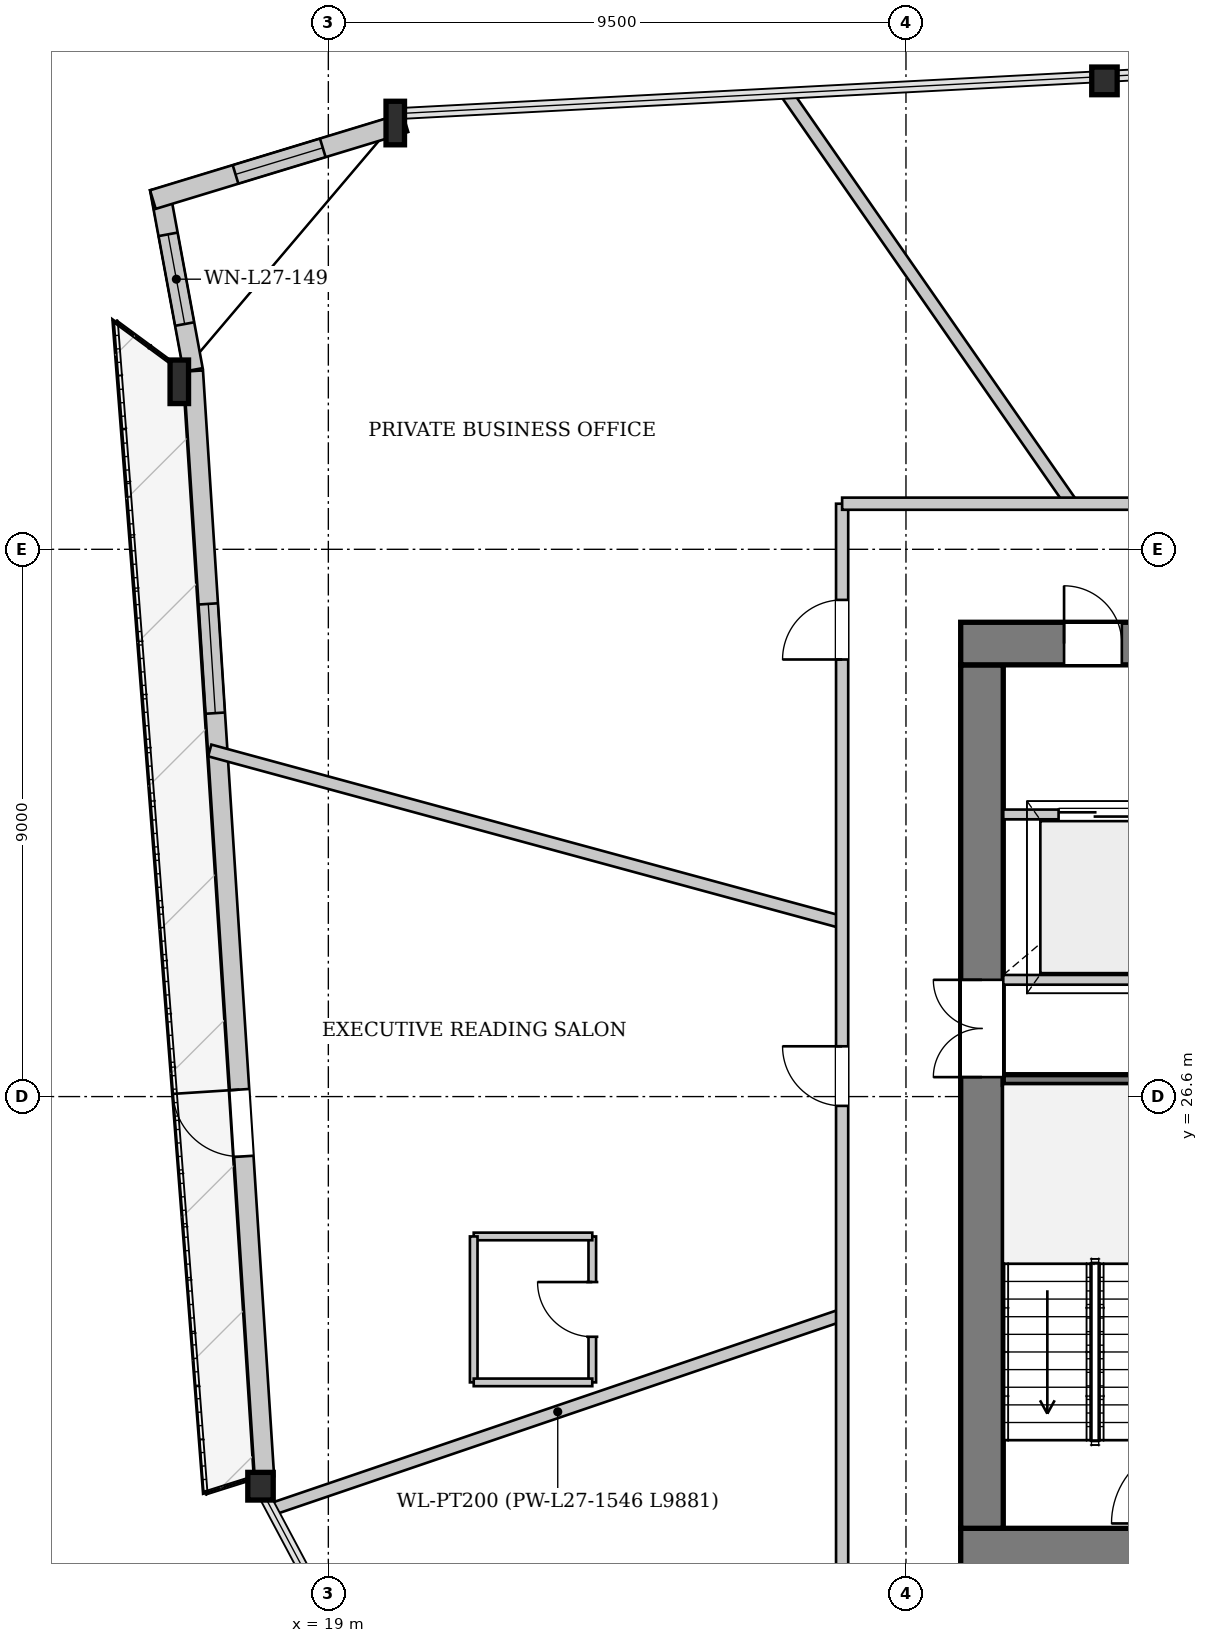
"""IFC4 building model, lengths in metres.
Left out: names, types, materials, properties, quantities, classifications, styles, units other than length and angle.
Written with IfcOpenShell. Run it as: python <this file> out.ifc"""

import sys

from ifc_helpers import new_model, si_unit, direction, frame, frame_2d, origin, origin_2d, place, context, subcontext, project, spatial, rectangle, i_section, extrude, source, transform, mapped, element, fill, save


model = new_model("IFC4")
c1 = context("Model", 3, precision=1e-05, world=origin(), true_north=direction((0.0, 1.0)))
c2 = subcontext(c1, "Body", "Model", "MODEL_VIEW")
j1 = project(units=[si_unit("LENGTHUNIT", "METRE"), si_unit("PLANEANGLEUNIT", "RADIAN")], contexts=[c1])
p1 = place(None, origin())
s1 = spatial("IfcSite", under=j1, at=p1, CompositionType="ELEMENT")
p2 = place(p1, origin())
s2 = spatial("IfcBuilding", under=s1, at=p2, CompositionType="ELEMENT")
p3 = place(p2, frame((0.0, 0.0, 105.7)))
s3 = spatial("IfcBuildingStorey", under=s2, at=p3, CompositionType="ELEMENT", Elevation=105.7)
m1 = source(origin(), c2, "Body", "SweptSolid", [
    extrude(i_section(OverallWidth=0.418, OverallDepth=0.455, WebThickness=0.038, FlangeThickness=0.059, at=origin_2d()), origin(), (0.0, 0.0, 1.0), 3.399),
])
p4 = place(p3, frame((31.897, 43.383, 0.0), z_axis=(-0.078216564077, -0.046685736134, 0.995842663851), x_axis=(0.512523153055, -0.858673405657, 0.0)))
e1 = element("IfcColumn", 1, at=p4, inside=s3, PredefinedType="COLUMN", context=c2, shape_type="MappedRepresentation", body=[
    mapped(m1, transform((0.0, 0.0, 0.0), x_axis=(1.0, 0.0, 0.0), y_axis=(0.0, 1.0, 0.0), z_axis=(0.0, 0.0, 1.0), scale=1.0)),
])
m2 = source(origin(), c2, "Body", "SweptSolid", [
    extrude(i_section(OverallWidth=0.304, OverallDepth=0.716, WebThickness=0.021, FlangeThickness=0.04, at=origin_2d()), origin(), (0.0, 0.0, 1.0), 3.408),
])
p5 = place(p3, frame((20.221, 42.769, 0.0), z_axis=(-0.070696817794, -0.093331259965, 0.993121964246), x_axis=(0.797127838914, -0.603810573299, 0.0)))
e2 = element("IfcColumn", 2, at=p5, inside=s3, PredefinedType="COLUMN", context=c2, shape_type="MappedRepresentation", body=[
    mapped(m2, transform((0.0, 0.0, 0.0), x_axis=(1.0, 0.0, 0.0), y_axis=(0.0, 1.0, 0.0), z_axis=(0.0, 0.0, 1.0), scale=1.0)),
])
m3 = source(origin(), c2, "Body", "SweptSolid", [
    extrude(i_section(OverallWidth=0.304, OverallDepth=0.716, WebThickness=0.021, FlangeThickness=0.04, at=origin_2d()), origin(), (0.0, 0.0, 1.0), 3.404),
])
p6 = place(p3, frame((16.619, 38.521, 0.0), z_axis=(-0.041093797697, -0.097821884919, 0.994355157186), x_axis=(0.921953144934, -0.387301431119, 0.0)))
e3 = element("IfcColumn", 3, at=p6, inside=s3, PredefinedType="COLUMN", context=c2, shape_type="MappedRepresentation", body=[
    mapped(m3, transform((0.0, 0.0, 0.0), x_axis=(1.0, 0.0, 0.0), y_axis=(0.0, 1.0, 0.0), z_axis=(0.0, 0.0, 1.0), scale=1.0)),
])
m4 = source(origin(), c2, "Body", "SweptSolid", [
    extrude(i_section(OverallWidth=0.418, OverallDepth=0.455, WebThickness=0.038, FlangeThickness=0.059, at=origin_2d()), origin(), (0.0, 0.0, 1.0), 3.403),
])
p7 = place(p3, frame((17.789, 20.337, 0.0), z_axis=(0.056108980358, -0.084737475451, 0.994822266828), x_axis=(0.833784053008, 0.552090710798, 0.0)))
e4 = element("IfcColumn", 4, at=p7, inside=s3, PredefinedType="COLUMN", context=c2, shape_type="MappedRepresentation", body=[
    mapped(m4, transform((0.0, 0.0, 0.0), x_axis=(1.0, 0.0, 0.0), y_axis=(0.0, 1.0, 0.0), z_axis=(0.0, 0.0, 1.0), scale=1.0)),
])
p8 = place(p3, frame((17.949, 20.347, 0.0), z_axis=(0.0, 0.0, 1.0), x_axis=(-0.06421657242, 0.997935985836, 0.0)))
e5 = element("IfcWall", 5, at=p8, inside=s3, PredefinedType="SOLIDWALL", context=c2, shape_type="SweptSolid", body=[
    extrude(rectangle(XDim=18.222, YDim=0.32, at=frame_2d((9.111, 0.0))), origin(), (0.0, 0.0, 1.0), 2.692),
])
p9 = place(p8, frame((5.281, 0.0, 0.0)))
e6 = element("IfcOpeningElement", 6, at=p9, cuts=e5, PredefinedType="OPENING", context=c2, shape_type="SweptSolid", body=[
    extrude(rectangle(XDim=1.1, YDim=2.3, at=frame_2d((0.55, 1.15))), frame((0.0, 0.17, 0.0), z_axis=(0.0, -1.0, 0.0), x_axis=(1.0, 0.0, 0.0)), (0.0, 0.0, 1.0), 0.34),
])
p10 = place(p8, frame((12.585, 0.0, 0.372)))
e7 = element("IfcOpeningElement", 7, at=p10, cuts=e5, PredefinedType="OPENING", context=c2, shape_type="SweptSolid", body=[
    extrude(rectangle(XDim=1.8, YDim=2.2, at=frame_2d((0.9, 1.1))), frame((0.0, 0.17, 0.0), z_axis=(0.0, -1.0, 0.0), x_axis=(1.0, 0.0, 0.0)), (0.0, 0.0, 1.0), 0.34),
])
p11 = place(p3, frame((16.776, 38.55, 0.0), z_axis=(0.0, 0.0, 1.0), x_axis=(-0.181703114271, 0.98335343507, 0.0)))
e8 = element("IfcWall", 8, at=p11, inside=s3, PredefinedType="SOLIDWALL", context=c2, shape_type="SweptSolid", body=[
    extrude(rectangle(XDim=3.034, YDim=0.32, at=frame_2d((1.517, 0.0))), origin(), (0.0, 0.0, 1.0), 2.692),
])
p12 = place(p11, frame((0.767, 0.0, 0.272)))
e9 = element("IfcOpeningElement", 9, at=p12, cuts=e8, PredefinedType="OPENING", context=c2, shape_type="SweptSolid", body=[
    extrude(rectangle(XDim=1.5, YDim=2.3, at=frame_2d((0.75, 1.15))), frame((0.0, 0.17, 0.0), z_axis=(0.0, -1.0, 0.0), x_axis=(1.0, 0.0, 0.0)), (0.0, 0.0, 1.0), 0.34),
])
p13 = place(p3, frame((16.114, 41.352, 0.0), z_axis=(0.0, 0.0, 1.0), x_axis=(0.956635734965, 0.291286921415, 0.0)))
e10 = element("IfcWall", 10, at=p13, inside=s3, PredefinedType="SOLIDWALL", context=c2, shape_type="SweptSolid", body=[
    extrude(rectangle(XDim=4.342, YDim=0.32, at=frame_2d((2.171, 0.0))), origin(), (0.0, 0.0, 1.0), 2.692),
])
p14 = place(p13, frame((1.421, 0.0, 0.272)))
e11 = element("IfcOpeningElement", 11, at=p14, cuts=e10, PredefinedType="OPENING", context=c2, shape_type="SweptSolid", body=[
    extrude(rectangle(XDim=1.5, YDim=2.3, at=frame_2d((0.75, 1.15))), frame((0.0, 0.17, 0.0), z_axis=(0.0, -1.0, 0.0), x_axis=(1.0, 0.0, 0.0)), (0.0, 0.0, 1.0), 0.34),
])
p15 = place(p3, frame((46.6, 19.15, 0.0), z_axis=(0.0, 0.0, 1.0), x_axis=(-1.0, 0.0, 0.0)))
e12 = element("IfcWall", 12, at=p15, inside=s3, PredefinedType="SHEAR", context=c2, shape_type="SweptSolid", body=[
    extrude(rectangle(XDim=17.2, YDim=0.7, at=frame_2d((8.6, 0.0))), origin(), (0.0, 0.0, 1.0), 3.3),
])
p16 = place(p15, frame((4.8, 0.0, 0.0)))
e13 = element("IfcOpeningElement", 13, at=p16, cuts=e12, PredefinedType="OPENING", context=c2, shape_type="SweptSolid", body=[
    extrude(rectangle(XDim=1.12, YDim=2.25, at=frame_2d((0.56, 1.125))), frame((0.0, 0.36, 0.0), z_axis=(0.0, -1.0, 0.0), x_axis=(1.0, 0.0, 0.0)), (0.0, 0.0, 1.0), 0.72),
])
p17 = place(p15, frame((11.3, 0.0, 0.0)))
e14 = element("IfcOpeningElement", 14, at=p17, cuts=e12, PredefinedType="OPENING", context=c2, shape_type="SweptSolid", body=[
    extrude(rectangle(XDim=1.12, YDim=2.25, at=frame_2d((0.56, 1.125))), frame((0.0, 0.36, 0.0), z_axis=(0.0, -1.0, 0.0), x_axis=(1.0, 0.0, 0.0)), (0.0, 0.0, 1.0), 0.72),
])
p18 = place(p3, frame((29.75, 19.5, 0.0), z_axis=(0.0, 0.0, 1.0), x_axis=(0.0, 1.0, 0.0)))
e15 = element("IfcWall", 15, at=p18, inside=s3, PredefinedType="SHEAR", context=c2, shape_type="SweptSolid", body=[
    extrude(rectangle(XDim=14.2, YDim=0.7, at=frame_2d((7.1, 0.0))), origin(), (0.0, 0.0, 1.0), 3.3),
])
p19 = place(p18, frame((7.42, 0.0, 0.0)))
e16 = element("IfcOpeningElement", 16, at=p19, cuts=e15, PredefinedType="OPENING", context=c2, shape_type="SweptSolid", body=[
    extrude(rectangle(XDim=1.6, YDim=2.2, at=frame_2d((0.8, 1.1))), frame((0.0, 0.36, 0.0), z_axis=(0.0, -1.0, 0.0), x_axis=(1.0, 0.0, 0.0)), (0.0, 0.0, 1.0), 0.72),
])
p20 = place(p3, frame((29.4, 34.05, 0.0), z_axis=(0.0, 0.0, 1.0), x_axis=(1.0, 0.0, 0.0)))
e17 = element("IfcWall", 17, at=p20, inside=s3, PredefinedType="SHEAR", context=c2, shape_type="SweptSolid", body=[
    extrude(rectangle(XDim=17.2, YDim=0.7, at=frame_2d((8.6, 0.0))), origin(), (0.0, 0.0, 1.0), 3.3),
])
p21 = place(p20, frame((1.7, 0.0, 0.0)))
e18 = element("IfcOpeningElement", 18, at=p21, cuts=e17, PredefinedType="OPENING", context=c2, shape_type="SweptSolid", body=[
    extrude(rectangle(XDim=0.95, YDim=2.1, at=frame_2d((0.475, 1.05))), frame((0.0, 0.36, 0.0), z_axis=(0.0, -1.0, 0.0), x_axis=(1.0, 0.0, 0.0)), (0.0, 0.0, 1.0), 0.72),
])
p22 = place(p20, frame((4.08, 0.0, 0.0)))
e19 = element("IfcOpeningElement", 19, at=p22, cuts=e17, PredefinedType="OPENING", context=c2, shape_type="SweptSolid", body=[
    extrude(rectangle(XDim=1.32, YDim=2.2, at=frame_2d((0.66, 1.1))), frame((0.0, 0.36, 0.0), z_axis=(0.0, -1.0, 0.0), x_axis=(1.0, 0.0, 0.0)), (0.0, 0.0, 1.0), 0.72),
])
p23 = place(p20, frame((15.15, 0.0, 0.0)))
e20 = element("IfcOpeningElement", 20, at=p23, cuts=e17, PredefinedType="OPENING", context=c2, shape_type="SweptSolid", body=[
    extrude(rectangle(XDim=0.95, YDim=2.1, at=frame_2d((0.475, 1.05))), frame((0.0, 0.36, 0.0), z_axis=(0.0, -1.0, 0.0), x_axis=(1.0, 0.0, 0.0)), (0.0, 0.0, 1.0), 0.72),
])
for number, where, z_axis, x_axis in (
    (21, (30.1, 26.88, 0.0), (0.0, 0.0, 1.0), (1.0, 0.0, 0.0)),
    (22, (30.1, 28.52, 0.0), (0.0, 0.0, 1.0), (1.0, 0.0, 0.0)),
):
    element("IfcWall", number, at=place(p3, frame(where, z_axis=z_axis, x_axis=x_axis)), inside=s3, PredefinedType="PARTITIONING", context=c2, shape_type="SweptSolid", body=[
        extrude(rectangle(XDim=3.02, YDim=0.16, at=frame_2d((1.51, 0.0))), origin(), (0.0, 0.0, 1.0), 3.3),
    ])
p24 = place(p3, frame((30.1, 31.24, 0.0), z_axis=(0.0, 0.0, 1.0), x_axis=(1.0, 0.0, 0.0)))
e23 = element("IfcWall", 23, at=p24, inside=s3, PredefinedType="PARTITIONING", context=c2, shape_type="SweptSolid", body=[
    extrude(rectangle(XDim=3.02, YDim=0.16, at=frame_2d((1.51, 0.0))), origin(), (0.0, 0.0, 1.0), 3.3),
])
p25 = place(p24, frame((0.91, 0.0, 0.0)))
e24 = element("IfcOpeningElement", 24, at=p25, cuts=e23, PredefinedType="OPENING", context=c2, shape_type="SweptSolid", body=[
    extrude(rectangle(XDim=1.2, YDim=2.2, at=frame_2d((0.6, 1.1))), frame((0.0, 0.09, 0.0), z_axis=(0.0, -1.0, 0.0), x_axis=(1.0, 0.0, 0.0)), (0.0, 0.0, 1.0), 0.18),
])
p26 = place(p3, frame((27.45, 23.009, 0.0), z_axis=(0.0, 0.0, 1.0), x_axis=(-0.946652953051, -0.3222548471, 0.0)))
e25 = element("IfcWall", 25, at=p26, inside=s3, PredefinedType="PARTITIONING", context=c2, shape_type="SweptSolid", body=[
    extrude(rectangle(XDim=9.881, YDim=0.2, at=frame_2d((4.941, 0.0))), origin(), (0.0, 0.0, 1.0), 2.785),
])
p27 = place(p3, frame((31.224, 36.35, 0.0), z_axis=(0.0, 0.0, 1.0), x_axis=(-0.570714905011, 0.821148279666, 0.0)))
e26 = element("IfcWall", 26, at=p27, inside=s3, PredefinedType="PARTITIONING", context=c2, shape_type="SweptSolid", body=[
    extrude(rectangle(XDim=8.186, YDim=0.2, at=frame_2d((4.093, 0.0))), origin(), (0.0, 0.0, 1.0), 3.3),
])
p28 = place(p3, frame((27.45, 29.466, 0.0), z_axis=(0.0, 0.0, 1.0), x_axis=(-0.96501587625, 0.262191454065, 0.0)))
e27 = element("IfcWall", 27, at=p28, inside=s3, PredefinedType="PARTITIONING", context=c2, shape_type="SweptSolid", body=[
    extrude(rectangle(XDim=10.777, YDim=0.2, at=frame_2d((5.389, 0.0))), origin(), (0.0, 0.0, 1.0), 3.3),
])
p29 = place(p3, frame((23.341, 21.9, 0.0), z_axis=(0.0, 0.0, 1.0), x_axis=(0.0, 1.0, 0.0)))
e28 = element("IfcWall", 28, at=p29, inside=s3, PredefinedType="PARTITIONING", context=c2, shape_type="SweptSolid", body=[
    extrude(rectangle(XDim=2.4, YDim=0.125, at=frame_2d((1.2, 0.0))), origin(), (0.0, 0.0, 1.0), 3.3),
])
p30 = place(p29, frame((0.75, 0.0, 0.0)))
e29 = element("IfcOpeningElement", 29, at=p30, cuts=e28, PredefinedType="OPENING", context=c2, shape_type="SweptSolid", body=[
    extrude(rectangle(XDim=0.9, YDim=2.1, at=frame_2d((0.45, 1.05))), frame((0.0, 0.073, 0.0), z_axis=(0.0, -1.0, 0.0), x_axis=(1.0, 0.0, 0.0)), (0.0, 0.0, 1.0), 0.145),
])
p31 = place(p3, frame((23.341, 24.3, 0.0), z_axis=(0.0, 0.0, 1.0), x_axis=(-1.0, 0.0, 0.0)))
e30 = element("IfcWall", 30, at=p31, inside=s3, PredefinedType="PARTITIONING", context=c2, shape_type="SweptSolid", body=[
    extrude(rectangle(XDim=1.95, YDim=0.125, at=frame_2d((0.975, 0.0))), origin(), (0.0, 0.0, 1.0), 3.3),
])
p32 = place(p3, frame((21.391, 24.3, 0.0), z_axis=(0.0, 0.0, 1.0), x_axis=(0.0, -1.0, 0.0)))
e31 = element("IfcWall", 31, at=p32, inside=s3, PredefinedType="PARTITIONING", context=c2, shape_type="SweptSolid", body=[
    extrude(rectangle(XDim=2.4, YDim=0.125, at=frame_2d((1.2, 0.0))), origin(), (0.0, 0.0, 1.0), 3.3),
])
p33 = place(p3, frame((21.391, 21.9, 0.0), z_axis=(0.0, 0.0, 1.0), x_axis=(1.0, 0.0, 0.0)))
e32 = element("IfcWall", 32, at=p33, inside=s3, PredefinedType="PARTITIONING", context=c2, shape_type="SweptSolid", body=[
    extrude(rectangle(XDim=1.95, YDim=0.125, at=frame_2d((0.975, 0.0))), origin(), (0.0, 0.0, 1.0), 2.785),
])
p34 = place(p3, frame((27.45, 16.85, 0.0), z_axis=(0.0, 0.0, 1.0), x_axis=(0.0, 1.0, 0.0)))
e33 = element("IfcWall", 33, at=p34, inside=s3, PredefinedType="PARTITIONING", context=c2, shape_type="SweptSolid", body=[
    extrude(rectangle(XDim=19.5, YDim=0.2, at=frame_2d((9.75, 0.0))), origin(), (0.0, 0.0, 1.0), 3.3),
])
p35 = place(p34, frame((16.938, 0.0, 0.0)))
e34 = element("IfcOpeningElement", 34, at=p35, cuts=e33, PredefinedType="OPENING", context=c2, shape_type="SweptSolid", body=[
    extrude(rectangle(XDim=0.98, YDim=2.15, at=frame_2d((0.49, 1.075))), frame((0.0, 0.11, 0.0), z_axis=(0.0, -1.0, 0.0), x_axis=(1.0, 0.0, 0.0)), (0.0, 0.0, 1.0), 0.22),
])
p36 = place(p34, frame((9.597, 0.0, 0.0)))
e35 = element("IfcOpeningElement", 35, at=p36, cuts=e33, PredefinedType="OPENING", context=c2, shape_type="SweptSolid", body=[
    extrude(rectangle(XDim=0.98, YDim=2.15, at=frame_2d((0.49, 1.075))), frame((0.0, 0.11, 0.0), z_axis=(0.0, -1.0, 0.0), x_axis=(1.0, 0.0, 0.0)), (0.0, 0.0, 1.0), 0.22),
])
p37 = place(p3, frame((27.45, 36.35, 0.0), z_axis=(0.0, 0.0, 1.0), x_axis=(1.0, 0.0, 0.0)))
e36 = element("IfcWall", 36, at=p37, inside=s3, PredefinedType="PARTITIONING", context=c2, shape_type="SweptSolid", body=[
    extrude(rectangle(XDim=21.1, YDim=0.2, at=frame_2d((10.55, 0.0))), origin(), (0.0, 0.0, 1.0), 3.3),
])
p38 = place(p37, frame((19.82, 0.0, 0.0)))
e37 = element("IfcOpeningElement", 37, at=p38, cuts=e36, PredefinedType="OPENING", context=c2, shape_type="SweptSolid", body=[
    extrude(rectangle(XDim=0.98, YDim=2.15, at=frame_2d((0.49, 1.075))), frame((0.0, 0.11, 0.0), z_axis=(0.0, -1.0, 0.0), x_axis=(1.0, 0.0, 0.0)), (0.0, 0.0, 1.0), 0.22),
])
p39 = place(p37, frame((5.605, 0.0, 0.0)))
e38 = element("IfcOpeningElement", 38, at=p39, cuts=e36, PredefinedType="OPENING", context=c2, shape_type="SweptSolid", body=[
    extrude(rectangle(XDim=0.98, YDim=2.15, at=frame_2d((0.49, 1.075))), frame((0.0, 0.11, 0.0), z_axis=(0.0, -1.0, 0.0), x_axis=(1.0, 0.0, 0.0)), (0.0, 0.0, 1.0), 0.22),
])
m5 = source(origin(), c2, "Body", "SweptSolid", [
    extrude(rectangle(XDim=1.1, YDim=2.3, at=frame_2d((0.55, 1.15))), frame((0.0, 0.025, 0.0), z_axis=(0.0, -1.0, 0.0), x_axis=(1.0, 0.0, 0.0)), (0.0, 0.0, 1.0), 0.05),
])
p40 = place(p9, origin())
e39 = element("IfcDoor", 39, at=p40, inside=s3, OperationType="SINGLE_SWING_RIGHT", PredefinedType="DOOR", context=c2, shape_type="MappedRepresentation", body=[
    mapped(m5, transform((0.0, 0.0, 0.0), x_axis=(1.0, 0.0, 0.0), y_axis=(0.0, 1.0, 0.0), z_axis=(0.0, 0.0, 1.0), scale=1.0)),
])
fill(e6, e39)
m6 = source(origin(), c2, "Body", "SweptSolid", [
    extrude(rectangle(XDim=1.8, YDim=2.2, at=frame_2d((0.9, 1.1))), frame((0.0, 0.03, 0.0), z_axis=(0.0, -1.0, 0.0), x_axis=(1.0, 0.0, 0.0)), (0.0, 0.0, 1.0), 0.06),
])
p41 = place(p10, origin())
e40 = element("IfcWindow", 40, at=p41, inside=s3, PartitioningType="SINGLE_PANEL", PredefinedType="WINDOW", context=c2, shape_type="MappedRepresentation", body=[
    mapped(m6, transform((0.0, 0.0, 0.0), x_axis=(1.0, 0.0, 0.0), y_axis=(0.0, 1.0, 0.0), z_axis=(0.0, 0.0, 1.0), scale=1.0)),
])
fill(e7, e40)
m7 = source(origin(), c2, "Body", "SweptSolid", [
    extrude(rectangle(XDim=1.5, YDim=2.3, at=frame_2d((0.75, 1.15))), frame((0.0, 0.03, 0.0), z_axis=(0.0, -1.0, 0.0), x_axis=(1.0, 0.0, 0.0)), (0.0, 0.0, 1.0), 0.06),
])
p42 = place(p12, origin())
e41 = element("IfcWindow", 41, at=p42, inside=s3, PartitioningType="SINGLE_PANEL", PredefinedType="WINDOW", context=c2, shape_type="MappedRepresentation", body=[
    mapped(m7, transform((0.0, 0.0, 0.0), x_axis=(1.0, 0.0, 0.0), y_axis=(0.0, 1.0, 0.0), z_axis=(0.0, 0.0, 1.0), scale=1.0)),
])
fill(e9, e41)
p43 = place(p14, origin())
e42 = element("IfcWindow", 42, at=p43, inside=s3, PartitioningType="SINGLE_PANEL", PredefinedType="WINDOW", context=c2, shape_type="MappedRepresentation", body=[
    mapped(m7, transform((0.0, 0.0, 0.0), x_axis=(1.0, 0.0, 0.0), y_axis=(0.0, 1.0, 0.0), z_axis=(0.0, 0.0, 1.0), scale=1.0)),
])
fill(e11, e42)
m8 = source(origin(), c2, "Body", "SweptSolid", [
    extrude(rectangle(XDim=1.6, YDim=2.2, at=frame_2d((0.8, 1.1))), frame((0.0, 0.025, 0.0), z_axis=(0.0, -1.0, 0.0), x_axis=(1.0, 0.0, 0.0)), (0.0, 0.0, 1.0), 0.05),
])
p44 = place(p19, origin())
e43 = element("IfcDoor", 43, at=p44, inside=s3, OperationType="DOUBLE_DOOR_SINGLE_SWING", PredefinedType="DOOR", context=c2, shape_type="MappedRepresentation", body=[
    mapped(m8, transform((0.0, 0.0, 0.0), x_axis=(1.0, 0.0, 0.0), y_axis=(0.0, 1.0, 0.0), z_axis=(0.0, 0.0, 1.0), scale=1.0)),
])
fill(e16, e43)
m9 = source(origin(), c2, "Body", "SweptSolid", [
    extrude(rectangle(XDim=0.95, YDim=2.1, at=frame_2d((0.475, 1.05))), frame((0.0, 0.025, 0.0), z_axis=(0.0, -1.0, 0.0), x_axis=(1.0, 0.0, 0.0)), (0.0, 0.0, 1.0), 0.05),
])
p45 = place(p21, origin())
e44 = element("IfcDoor", 44, at=p45, inside=s3, OperationType="SINGLE_SWING_LEFT", PredefinedType="DOOR", context=c2, shape_type="MappedRepresentation", body=[
    mapped(m9, transform((0.0, 0.0, 0.0), x_axis=(1.0, 0.0, 0.0), y_axis=(0.0, 1.0, 0.0), z_axis=(0.0, 0.0, 1.0), scale=1.0)),
])
fill(e18, e44)
m10 = source(origin(), c2, "Body", "SweptSolid", [
    extrude(rectangle(XDim=1.2, YDim=2.2, at=frame_2d((0.6, 1.1))), frame((0.0, 0.025, 0.0), z_axis=(0.0, -1.0, 0.0), x_axis=(1.0, 0.0, 0.0)), (0.0, 0.0, 1.0), 0.05),
])
p46 = place(p25, origin())
e45 = element("IfcDoor", 45, at=p46, inside=s3, OperationType="DOUBLE_DOOR_SLIDING", PredefinedType="DOOR", context=c2, shape_type="MappedRepresentation", body=[
    mapped(m10, transform((0.0, 0.0, 0.0), x_axis=(1.0, 0.0, 0.0), y_axis=(0.0, 1.0, 0.0), z_axis=(0.0, 0.0, 1.0), scale=1.0)),
])
fill(e24, e45)
m11 = source(origin(), c2, "Body", "SweptSolid", [
    extrude(rectangle(XDim=0.9, YDim=2.1, at=frame_2d((0.45, 1.05))), frame((0.0, 0.025, 0.0), z_axis=(0.0, -1.0, 0.0), x_axis=(1.0, 0.0, 0.0)), (0.0, 0.0, 1.0), 0.05),
])
p47 = place(p30, origin())
e46 = element("IfcDoor", 46, at=p47, inside=s3, OperationType="SINGLE_SWING_RIGHT", PredefinedType="DOOR", context=c2, shape_type="MappedRepresentation", body=[
    mapped(m11, transform((0.0, 0.0, 0.0), x_axis=(1.0, 0.0, 0.0), y_axis=(0.0, 1.0, 0.0), z_axis=(0.0, 0.0, 1.0), scale=1.0)),
])
fill(e29, e46)
m12 = source(origin(), c2, "Body", "SweptSolid", [
    extrude(rectangle(XDim=0.98, YDim=2.15, at=frame_2d((0.49, 1.075))), frame((0.0, 0.025, 0.0), z_axis=(0.0, -1.0, 0.0), x_axis=(1.0, 0.0, 0.0)), (0.0, 0.0, 1.0), 0.05),
])
p48 = place(p35, origin())
e47 = element("IfcDoor", 47, at=p48, inside=s3, OperationType="SINGLE_SWING_LEFT", PredefinedType="DOOR", context=c2, shape_type="MappedRepresentation", body=[
    mapped(m12, transform((0.0, 0.0, 0.0), x_axis=(1.0, 0.0, 0.0), y_axis=(0.0, 1.0, 0.0), z_axis=(0.0, 0.0, 1.0), scale=1.0)),
])
fill(e34, e47)
p49 = place(p36, origin())
e48 = element("IfcDoor", 48, at=p49, inside=s3, OperationType="SINGLE_SWING_RIGHT", PredefinedType="DOOR", context=c2, shape_type="MappedRepresentation", body=[
    mapped(m12, transform((0.0, 0.0, 0.0), x_axis=(1.0, 0.0, 0.0), y_axis=(0.0, 1.0, 0.0), z_axis=(0.0, 0.0, 1.0), scale=1.0)),
])
fill(e35, e48)
save(model, sys.argv[1])
